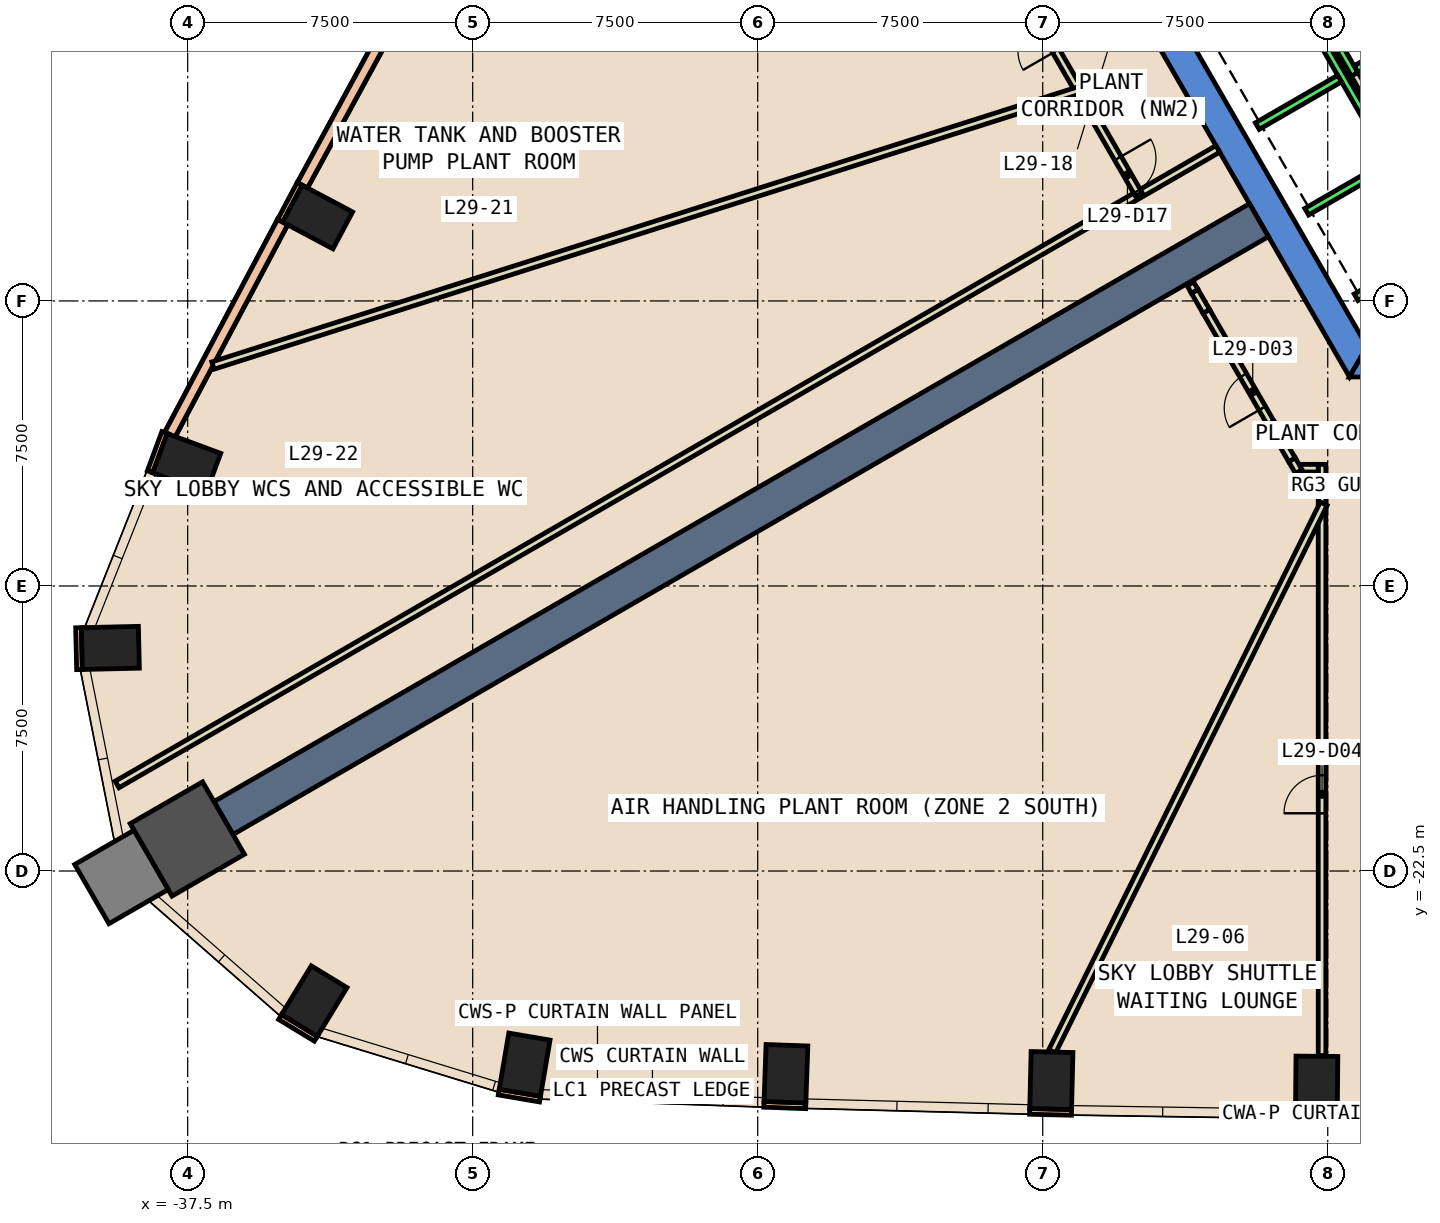
"""IFC4 building model, lengths in metres.
Left out: names, types, materials, properties, quantities, classifications, styles, units other than length and angle.
Written with IfcOpenShell. Run it as: python <this file> out.ifc"""

import sys

from ifc_helpers import new_model, si_unit, direction, frame, frame_2d, origin, origin_2d, place, context, subcontext, project, spatial, polyline, rectangle, outline, extrude, element, fill, save


model = new_model("IFC4")
c1 = context("Model", 3, precision=1e-05, world=origin(), true_north=direction((0.0, 1.0)))
c2 = subcontext(c1, "Body", "Model", "MODEL_VIEW")
j1 = project(units=[si_unit("LENGTHUNIT", "METRE"), si_unit("PLANEANGLEUNIT", "RADIAN")], contexts=[c1])
p1 = place(None, origin())
s1 = spatial("IfcSite", under=j1, at=p1, CompositionType="ELEMENT")
p2 = place(p1, origin())
s2 = spatial("IfcBuilding", under=s1, at=p2, CompositionType="ELEMENT")
p3 = place(p2, frame((0.0, 0.0, 132.8)))
s3 = spatial("IfcBuildingStorey", under=s2, at=p3, CompositionType="ELEMENT", Elevation=132.8)
for number, where, z_axis, x_axis in (
    (1, (-28.633, -27.596, -0.6), (0.0, 0.0, 1.0), (-0.986, 0.168, 0.0)),
    (2, (-21.757, -27.834, -0.6), (0.0, 0.0, 1.0), (-0.999, 0.035, 0.0)),
    (3, (-14.773, -28.013, -0.6), (0.0, 0.0, 1.0), (-1.0, 0.024, 0.0)),
    (4, (-7.792, -28.125, -0.6), (0.0, 0.0, 1.0), (-1.0, 0.009, 0.0)),
    (5, (-34.081, -5.292, -0.6), (0.0, 0.0, 1.0), (0.469, 0.883, 0.0)),
    (6, (-37.525, -11.766, -0.6), (0.0, 0.0, 1.0), (0.347, 0.938, 0.0)),
    (7, (-39.534, -16.63, -0.6), (0.0, 0.0, 1.0), (-0.023, 1.0, 0.0)),
):
    element("IfcColumn", number, at=place(p3, frame(where, z_axis=z_axis, x_axis=x_axis)), inside=s3, PredefinedType="COLUMN", context=c2, shape_type="SweptSolid", body=[
        extrude(rectangle(XDim=1.1, YDim=1.5, at=origin_2d()), origin(), (0.0, 0.0, 1.0), 5.4),
    ])
p4 = place(p3, frame((-37.51, -21.657, -0.6), z_axis=(0.0, 0.0, 1.0), x_axis=(0.866025403784, 0.5, 0.0)))
e8 = element("IfcColumn", 8, at=p4, inside=s3, PredefinedType="COLUMN", context=c2, shape_type="SweptSolid", body=[
    extrude(rectangle(XDim=2.2, YDim=2.2, at=origin_2d()), origin(), (0.0, 0.0, 1.0), 5.4),
])
p5 = place(p3, frame((-34.168, -25.922, -0.6), z_axis=(0.0, 0.0, 1.0), x_axis=(-0.854095929175, 0.520115510024, 0.0)))
e9 = element("IfcColumn", 9, at=p5, inside=s3, PredefinedType="COLUMN", context=c2, shape_type="SweptSolid", body=[
    extrude(rectangle(XDim=1.1, YDim=1.5, at=origin_2d()), origin(), (0.0, 0.0, 1.0), 5.4),
])
p6 = place(p3, frame((-39.242, -22.657, -0.6), z_axis=(0.0, 0.0, 1.0), x_axis=(0.866025403784, 0.5, 0.0)))
e10 = element("IfcColumn", 10, at=p6, inside=s3, PredefinedType="COLUMN", context=c2, shape_type="SweptSolid", body=[
    extrude(rectangle(XDim=1.8, YDim=1.8, at=origin_2d()), origin(), (0.0, 0.0, 1.0), 5.4),
])
p7 = place(p3, frame((0.0, 0.0, -0.6)))
e11 = element("IfcWall", 11, at=p7, inside=s3, PredefinedType="SHEAR", context=c2, shape_type="SweptSolid", body=[
    extrude(outline(polyline([(-13.856, 2.5), (-6.928, -9.5), (-6.466, -8.7), (-12.933, 2.5), (-13.856, 2.5)])), origin(), (0.0, 0.0, 1.0), 5.4),
])
p8 = place(p3, frame((0.0, 0.0, -0.6)))
e12 = element("IfcWall", 12, at=p8, inside=s3, PredefinedType="SHEAR", context=c2, shape_type="SweptSolid", body=[
    extrude(outline(polyline([(3.75, -9.5), (3.75, -8.7), (-6.466, -8.7), (-6.928, -9.5), (3.75, -9.5)])), origin(), (0.0, 0.0, 1.0), 5.4),
])
p9 = place(p3, frame((-9.31, -5.375, 0.0), z_axis=(0.0, 0.0, 1.0), x_axis=(-0.86602173752, -0.500006350103, 0.0)))
e13 = element("IfcWall", 13, at=p9, inside=s3, PredefinedType="SHEAR", context=c2, shape_type="SweptSolid", body=[
    extrude(rectangle(XDim=31.463, YDim=1.0, at=frame_2d((15.732, 0.0))), origin(), (0.0, 0.0, 1.0), 4.8),
])
p10 = place(p3, frame((-34.552, -4.42, 0.0), z_axis=(0.0, 0.0, 1.0), x_axis=(-0.469274244365, -0.883052480646, 0.0)))
e14 = element("IfcWall", 14, at=p10, inside=s3, PredefinedType="STANDARD", context=c2, shape_type="SweptSolid", body=[
    extrude(rectangle(XDim=1.1, YDim=0.15, at=frame_2d((0.55, 0.0))), origin(), (0.0, 0.0, 1.0), 4.8),
])
for number, where, z_axis, x_axis in (
    (15, (-38.108, -10.963, 0.0), (0.0, 0.0, 1.0), (-0.347, -0.938, 0.0)),
    (16, (-29.314, -28.317, 0.0), (0.0, 0.0, 1.0), (0.986, -0.168, 0.0)),
):
    element("IfcWall", number, at=place(p3, frame(where, z_axis=z_axis, x_axis=x_axis)), inside=s3, PredefinedType="STANDARD", context=c2, shape_type="SweptSolid", body=[
        extrude(rectangle(XDim=1.101, YDim=0.15, at=frame_2d((0.55, 0.0))), origin(), (0.0, 0.0, 1.0), 4.8),
    ])
p11 = place(p3, frame((-22.336, -28.639, 0.0), z_axis=(0.0, 0.0, 1.0), x_axis=(0.999368780235, -0.035525217693, 0.0)))
e17 = element("IfcWall", 17, at=p11, inside=s3, PredefinedType="STANDARD", context=c2, shape_type="SweptSolid", body=[
    extrude(rectangle(XDim=1.1, YDim=0.15, at=frame_2d((0.55, 0.0))), origin(), (0.0, 0.0, 1.0), 4.8),
])
p12 = place(p3, frame((-15.343, -28.825, 0.0), z_axis=(0.0, 0.0, 1.0), x_axis=(0.999718180159, -0.023739424163, 0.0)))
e18 = element("IfcWall", 18, at=p12, inside=s3, PredefinedType="STANDARD", context=c2, shape_type="SweptSolid", body=[
    extrude(rectangle(XDim=1.1, YDim=0.15, at=frame_2d((0.55, 0.0))), origin(), (0.0, 0.0, 1.0), 4.8),
])
for number, where, z_axis, x_axis in (
    (19, (-8.349, -28.945, 0.0), (0.0, 0.0, 1.0), (1.0, -0.009, 0.0)),
    (20, (-40.372, -16.099, 0.0), (0.0, 0.0, 1.0), (0.024, -1.0, 0.0)),
):
    element("IfcWall", number, at=place(p3, frame(where, z_axis=z_axis, x_axis=x_axis)), inside=s3, PredefinedType="STANDARD", context=c2, shape_type="SweptSolid", body=[
        extrude(rectangle(XDim=1.1, YDim=0.15, at=frame_2d((0.55, 0.0))), origin(), (0.0, 0.0, 1.0), 4.8),
    ])
p13 = place(p3, frame((-35.067, -26.341, 0.0), z_axis=(0.0, 0.0, 1.0), x_axis=(0.854245682901, -0.519869515594, 0.0)))
e21 = element("IfcWall", 21, at=p13, inside=s3, PredefinedType="STANDARD", context=c2, shape_type="SweptSolid", body=[
    extrude(rectangle(XDim=1.1, YDim=0.15, at=frame_2d((0.55, 0.0))), origin(), (0.0, 0.0, 1.0), 4.8),
])
p14 = place(p3, frame((-31.558, 0.918, 0.0), z_axis=(0.0, 0.0, 1.0), x_axis=(-0.477655263247, -0.878547351879, 0.0)))
e22 = element("IfcWall", 22, at=p14, inside=s3, PredefinedType="STANDARD", context=c2, shape_type="SweptSolid", body=[
    extrude(rectangle(XDim=6.119, YDim=0.3, at=frame_2d((3.06, 0.0))), origin(), (0.0, 0.0, 1.0), 1.2),
])
p15 = place(p3, frame((-31.558, 0.918, 4.0), z_axis=(0.0, 0.0, 1.0), x_axis=(-0.477655263247, -0.878547351879, 0.0)))
e23 = element("IfcWall", 23, at=p15, inside=s3, PredefinedType="STANDARD", context=c2, shape_type="SweptSolid", body=[
    extrude(rectangle(XDim=6.119, YDim=0.3, at=frame_2d((3.06, 0.0))), origin(), (0.0, 0.0, 1.0), 0.8),
])
p16 = place(p3, frame((-35.001, -5.425, 0.0), z_axis=(0.0, 0.0, 1.0), x_axis=(-0.468639020107, -0.88338976043, 0.0)))
e24 = element("IfcWall", 24, at=p16, inside=s3, PredefinedType="STANDARD", context=c2, shape_type="SweptSolid", body=[
    extrude(rectangle(XDim=6.329, YDim=0.3, at=frame_2d((3.165, 0.0))), origin(), (0.0, 0.0, 1.0), 1.2),
])
p17 = place(p3, frame((-35.001, -5.425, 4.0), z_axis=(0.0, 0.0, 1.0), x_axis=(-0.468639020107, -0.88338976043, 0.0)))
e25 = element("IfcWall", 25, at=p17, inside=s3, PredefinedType="STANDARD", context=c2, shape_type="SweptSolid", body=[
    extrude(rectangle(XDim=6.329, YDim=0.3, at=frame_2d((3.165, 0.0))), origin(), (0.0, 0.0, 1.0), 0.8),
])
p18 = place(p3, frame((-5.492, -3.788, 0.0), z_axis=(0.0, 0.0, 1.0), x_axis=(-0.500008949224, 0.866020236886, 0.0)))
e26 = element("IfcWall", 26, at=p18, inside=s3, PredefinedType="PARTITIONING", context=c2, shape_type="SweptSolid", body=[
    extrude(rectangle(XDim=2.68, YDim=0.2, at=frame_2d((1.34, 0.0))), origin(), (0.0, 0.0, 1.0), 4.8),
])
p19 = place(p3, frame((-7.65, -12.826, 0.0), z_axis=(0.0, 0.0, 1.0), x_axis=(0.0, 1.0, 0.0)))
e27 = element("IfcWall", 27, at=p19, inside=s3, PredefinedType="PARTITIONING", context=c2, shape_type="SweptSolid", body=[
    extrude(rectangle(XDim=1.026, YDim=0.2, at=frame_2d((0.513, 0.0))), origin(), (0.0, 0.0, 1.0), 4.8),
])
p20 = place(p3, frame((-7.75, -11.9, 0.0), z_axis=(0.0, 0.0, 1.0), x_axis=(-1.0, 0.0, 0.0)))
e28 = element("IfcWall", 28, at=p20, inside=s3, PredefinedType="PARTITIONING", context=c2, shape_type="SweptSolid", body=[
    extrude(rectangle(XDim=0.464, YDim=0.2, at=frame_2d((0.232, 0.0))), origin(), (0.0, 0.0, 1.0), 4.8),
])
p21 = place(p3, frame((-8.264, -11.987, 0.0), z_axis=(0.0, 0.0, 1.0), x_axis=(-0.499011179969, 0.866595547107, 0.0)))
e29 = element("IfcWall", 29, at=p21, inside=s3, PredefinedType="PARTITIONING", context=c2, shape_type="SweptSolid", body=[
    extrude(rectangle(XDim=0.357, YDim=0.2, at=frame_2d((0.178, 0.0))), origin(), (0.0, 0.0, 1.0), 4.8),
])
p22 = place(p3, frame((-7.65, -27.356, 0.0), z_axis=(0.0, 0.0, 1.0), x_axis=(0.0, 1.0, 0.0)))
e30 = element("IfcWall", 30, at=p22, inside=s3, PredefinedType="PARTITIONING", context=c2, shape_type="SweptSolid", body=[
    extrude(rectangle(XDim=14.33, YDim=0.2, at=frame_2d((7.165, 0.0))), origin(), (0.0, 0.0, 1.0), 4.8),
])
p23 = place(p22, frame((6.375, 0.0, 0.0)))
e31 = element("IfcOpeningElement", 31, at=p23, cuts=e30, PredefinedType="OPENING", context=c2, shape_type="SweptSolid", body=[
    extrude(rectangle(XDim=1.0, YDim=2.1, at=frame_2d((0.5, 1.05))), frame((0.0, 0.11, 0.0), z_axis=(0.0, -1.0, 0.0), x_axis=(1.0, 0.0, 0.0)), (0.0, 0.0, 1.0), 0.22),
])
p24 = place(p3, frame((-7.606, -12.836, 0.0), z_axis=(0.0, 0.0, 1.0), x_axis=(-0.444253710324, -0.895901021801, 0.0)))
e32 = element("IfcWall", 32, at=p24, inside=s3, PredefinedType="PARTITIONING", context=c2, shape_type="SweptSolid", body=[
    extrude(rectangle(XDim=16.081, YDim=0.2, at=frame_2d((8.041, 0.0))), origin(), (0.0, 0.0, 1.0), 4.8),
])
p25 = place(p3, frame((-39.358, -20.223, 0.0), z_axis=(0.0, 0.0, 1.0), x_axis=(0.866032184561, 0.499988255166, 0.0)))
e33 = element("IfcWall", 33, at=p25, inside=s3, PredefinedType="PARTITIONING", context=c2, shape_type="SweptSolid", body=[
    extrude(rectangle(XDim=33.447, YDim=0.2, at=frame_2d((16.723, 0.0))), origin(), (0.0, 0.0, 1.0), 4.8),
])
p26 = place(p3, frame((-14.001, -2.05, 0.0), z_axis=(0.0, 0.0, 1.0), x_axis=(-0.499842197933, 0.866116491683, 0.0)))
e34 = element("IfcWall", 34, at=p26, inside=s3, PredefinedType="PARTITIONING", context=c2, shape_type="SweptSolid", body=[
    extrude(rectangle(XDim=5.354, YDim=0.2, at=frame_2d((2.677, 0.0))), origin(), (0.0, 0.0, 1.0), 4.8),
])
p27 = place(p26, frame((1.301, 0.0, 0.0)))
e35 = element("IfcOpeningElement", 35, at=p27, cuts=e34, PredefinedType="OPENING", context=c2, shape_type="SweptSolid", body=[
    extrude(rectangle(XDim=1.0, YDim=2.1, at=frame_2d((0.5, 1.05))), frame((0.0, 0.11, 0.0), z_axis=(0.0, -1.0, 0.0), x_axis=(1.0, 0.0, 0.0)), (0.0, 0.0, 1.0), 0.22),
])
p28 = place(p3, frame((-14.001, -2.05, 0.0), z_axis=(0.0, 0.0, 1.0), x_axis=(0.500026340207, -0.866010195725, 0.0)))
e36 = element("IfcWall", 36, at=p28, inside=s3, PredefinedType="PARTITIONING", context=c2, shape_type="SweptSolid", body=[
    extrude(rectangle(XDim=3.06, YDim=0.2, at=frame_2d((1.53, 0.0))), origin(), (0.0, 0.0, 1.0), 4.8),
])
p29 = place(p28, frame((1.96, 0.0, 0.0)))
e37 = element("IfcOpeningElement", 37, at=p29, cuts=e36, PredefinedType="OPENING", context=c2, shape_type="SweptSolid", body=[
    extrude(rectangle(XDim=1.0, YDim=2.1, at=frame_2d((0.5, 1.05))), frame((0.0, 0.11, 0.0), z_axis=(0.0, -1.0, 0.0), x_axis=(1.0, 0.0, 0.0)), (0.0, 0.0, 1.0), 0.22),
])
p30 = place(p3, frame((-14.051, -1.963, 0.0), z_axis=(0.0, 0.0, 1.0), x_axis=(-0.953071469252, -0.302745395504, 0.0)))
e38 = element("IfcWall", 38, at=p30, inside=s3, PredefinedType="PARTITIONING", context=c2, shape_type="SweptSolid", body=[
    extrude(rectangle(XDim=23.905, YDim=0.2, at=frame_2d((11.952, 0.0))), origin(), (0.0, 0.0, 1.0), 4.8),
])
p31 = place(p3, frame((-8.442, -11.678, 0.0), z_axis=(0.0, 0.0, 1.0), x_axis=(-0.500408426468, 0.865789470206, 0.0)))
e39 = element("IfcWall", 39, at=p31, inside=s3, PredefinedType="PARTITIONING", context=c2, shape_type="SweptSolid", body=[
    extrude(rectangle(XDim=1.119, YDim=0.2, at=frame_2d((0.56, 0.0))), origin(), (0.0, 0.0, 1.0), 2.4),
])
p32 = place(p3, frame((-9.002, -10.709, 0.0), z_axis=(0.0, 0.0, 1.0), x_axis=(-0.499654870059, 0.866224572975, 0.0)))
e40 = element("IfcWall", 40, at=p32, inside=s3, PredefinedType="PARTITIONING", context=c2, shape_type="SweptSolid", body=[
    extrude(rectangle(XDim=2.398, YDim=0.2, at=frame_2d((1.199, 0.0))), origin(), (0.0, 0.0, 1.0), 4.8),
])
p33 = place(p32, frame((0.444, 0.0, 0.0)))
e41 = element("IfcOpeningElement", 41, at=p33, cuts=e40, PredefinedType="OPENING", context=c2, shape_type="SweptSolid", body=[
    extrude(rectangle(XDim=1.0, YDim=2.1, at=frame_2d((0.5, 1.05))), frame((0.0, 0.11, 0.0), z_axis=(0.0, -1.0, 0.0), x_axis=(1.0, 0.0, 0.0)), (0.0, 0.0, 1.0), 0.22),
])
p34 = place(p3, frame((-10.2, -8.632, 0.0), z_axis=(0.0, 0.0, 1.0), x_axis=(-0.500482758314, 0.865746503678, 0.0)))
e42 = element("IfcWall", 42, at=p34, inside=s3, PredefinedType="PARTITIONING", context=c2, shape_type="SweptSolid", body=[
    extrude(rectangle(XDim=0.991, YDim=0.2, at=frame_2d((0.496, 0.0))), origin(), (0.0, 0.0, 1.0), 2.3),
])
p35 = place(p3, frame((-10.696, -7.774, 0.0), z_axis=(0.0, 0.0, 1.0), x_axis=(-0.49972245349, 0.866185586049, 0.0)))
e43 = element("IfcWall", 43, at=p35, inside=s3, PredefinedType="PARTITIONING", context=c2, shape_type="SweptSolid", body=[
    extrude(rectangle(XDim=0.608, YDim=0.2, at=frame_2d((0.304, 0.0))), origin(), (0.0, 0.0, 1.0), 4.8),
])
p36 = place(p3, frame((-11.0, -7.247, 0.0), z_axis=(0.0, 0.0, 1.0), x_axis=(-0.499504513693, 0.866311284008, 0.0)))
e44 = element("IfcWall", 44, at=p36, inside=s3, PredefinedType="PARTITIONING", context=c2, shape_type="SweptSolid", body=[
    extrude(rectangle(XDim=0.226, YDim=0.2, at=frame_2d((0.113, 0.0))), origin(), (0.0, 0.0, 1.0), 2.1),
])
p37 = place(p3, frame((-8.192, 0.888, 0.0), z_axis=(0.0, 0.0, 1.0), x_axis=(0.49994636267, -0.866056369097, 0.0)))
e45 = element("IfcWall", 45, at=p37, inside=s3, PredefinedType="STANDARD", context=c2, shape_type="SweptSolid", body=[
    extrude(rectangle(XDim=2.8, YDim=0.2, at=frame_2d((1.4, 0.0))), origin(), (0.0, 0.0, 1.0), 4.8),
])
p38 = place(p3, frame((-4.677, -0.2, 0.0), z_axis=(0.0, 0.0, 1.0), x_axis=(-0.865973769406, -0.500089422704, 0.0)))
e46 = element("IfcWall", 46, at=p38, inside=s3, PredefinedType="STANDARD", context=c2, shape_type="SweptSolid", body=[
    extrude(rectangle(XDim=2.399, YDim=0.2, at=frame_2d((1.2, 0.0))), origin(), (0.0, 0.0, 1.0), 4.8),
])
p39 = place(p3, frame((-9.751, 2.99, 0.0), z_axis=(0.0, 0.0, 1.0), x_axis=(0.50000090737, -0.866024879913, 0.0)))
e47 = element("IfcWall", 47, at=p39, inside=s3, PredefinedType="STANDARD", context=c2, shape_type="SweptSolid", body=[
    extrude(rectangle(XDim=10.6, YDim=0.2, at=frame_2d((5.3, 0.0))), origin(), (0.0, 0.0, 1.0), 4.8),
])
for number, where, z_axis, x_axis in (
    (48, (-7.188, -1.65, 0.0), (0.0, 0.0, 1.0), (-0.866, -0.5, 0.0)),
    (49, (-5.888, -3.902, 0.0), (0.0, 0.0, 1.0), (-0.866, -0.5, 0.0)),
    (50, (-4.588, -6.153, 0.0), (0.0, 0.0, 1.0), (-0.866, -0.5, 0.0)),
):
    element("IfcWall", number, at=place(p3, frame(where, z_axis=z_axis, x_axis=x_axis)), inside=s3, PredefinedType="STANDARD", context=c2, shape_type="SweptSolid", body=[
        extrude(rectangle(XDim=2.5, YDim=0.2, at=frame_2d((1.25, 0.0))), origin(), (0.0, 0.0, 1.0), 4.8),
    ])
p40 = place(p33, origin())
e51 = element("IfcDoor", 51, at=p40, inside=s3, OperationType="SINGLE_SWING_LEFT", PredefinedType="DOOR", context=c2, shape_type="SweptSolid", body=[
    extrude(rectangle(XDim=1.0, YDim=2.1, at=frame_2d((0.5, 1.05))), frame((0.0, 0.025, 0.0), z_axis=(0.0, -1.0, 0.0), x_axis=(1.0, 0.0, 0.0)), (0.0, 0.0, 1.0), 0.05),
])
fill(e41, e51)
p41 = place(p23, origin())
e52 = element("IfcDoor", 52, at=p41, inside=s3, OperationType="SINGLE_SWING_RIGHT", PredefinedType="DOOR", context=c2, shape_type="SweptSolid", body=[
    extrude(rectangle(XDim=1.0, YDim=2.1, at=frame_2d((0.5, 1.05))), frame((0.0, 0.025, 0.0), z_axis=(0.0, -1.0, 0.0), x_axis=(1.0, 0.0, 0.0)), (0.0, 0.0, 1.0), 0.05),
])
fill(e31, e52)
p42 = place(p29, origin())
e53 = element("IfcDoor", 53, at=p42, inside=s3, OperationType="SINGLE_SWING_LEFT", PredefinedType="DOOR", context=c2, shape_type="SweptSolid", body=[
    extrude(rectangle(XDim=1.0, YDim=2.1, at=frame_2d((0.5, 1.05))), frame((0.0, 0.025, 0.0), z_axis=(0.0, -1.0, 0.0), x_axis=(1.0, 0.0, 0.0)), (0.0, 0.0, 1.0), 0.05),
])
fill(e37, e53)
save(model, sys.argv[1])
